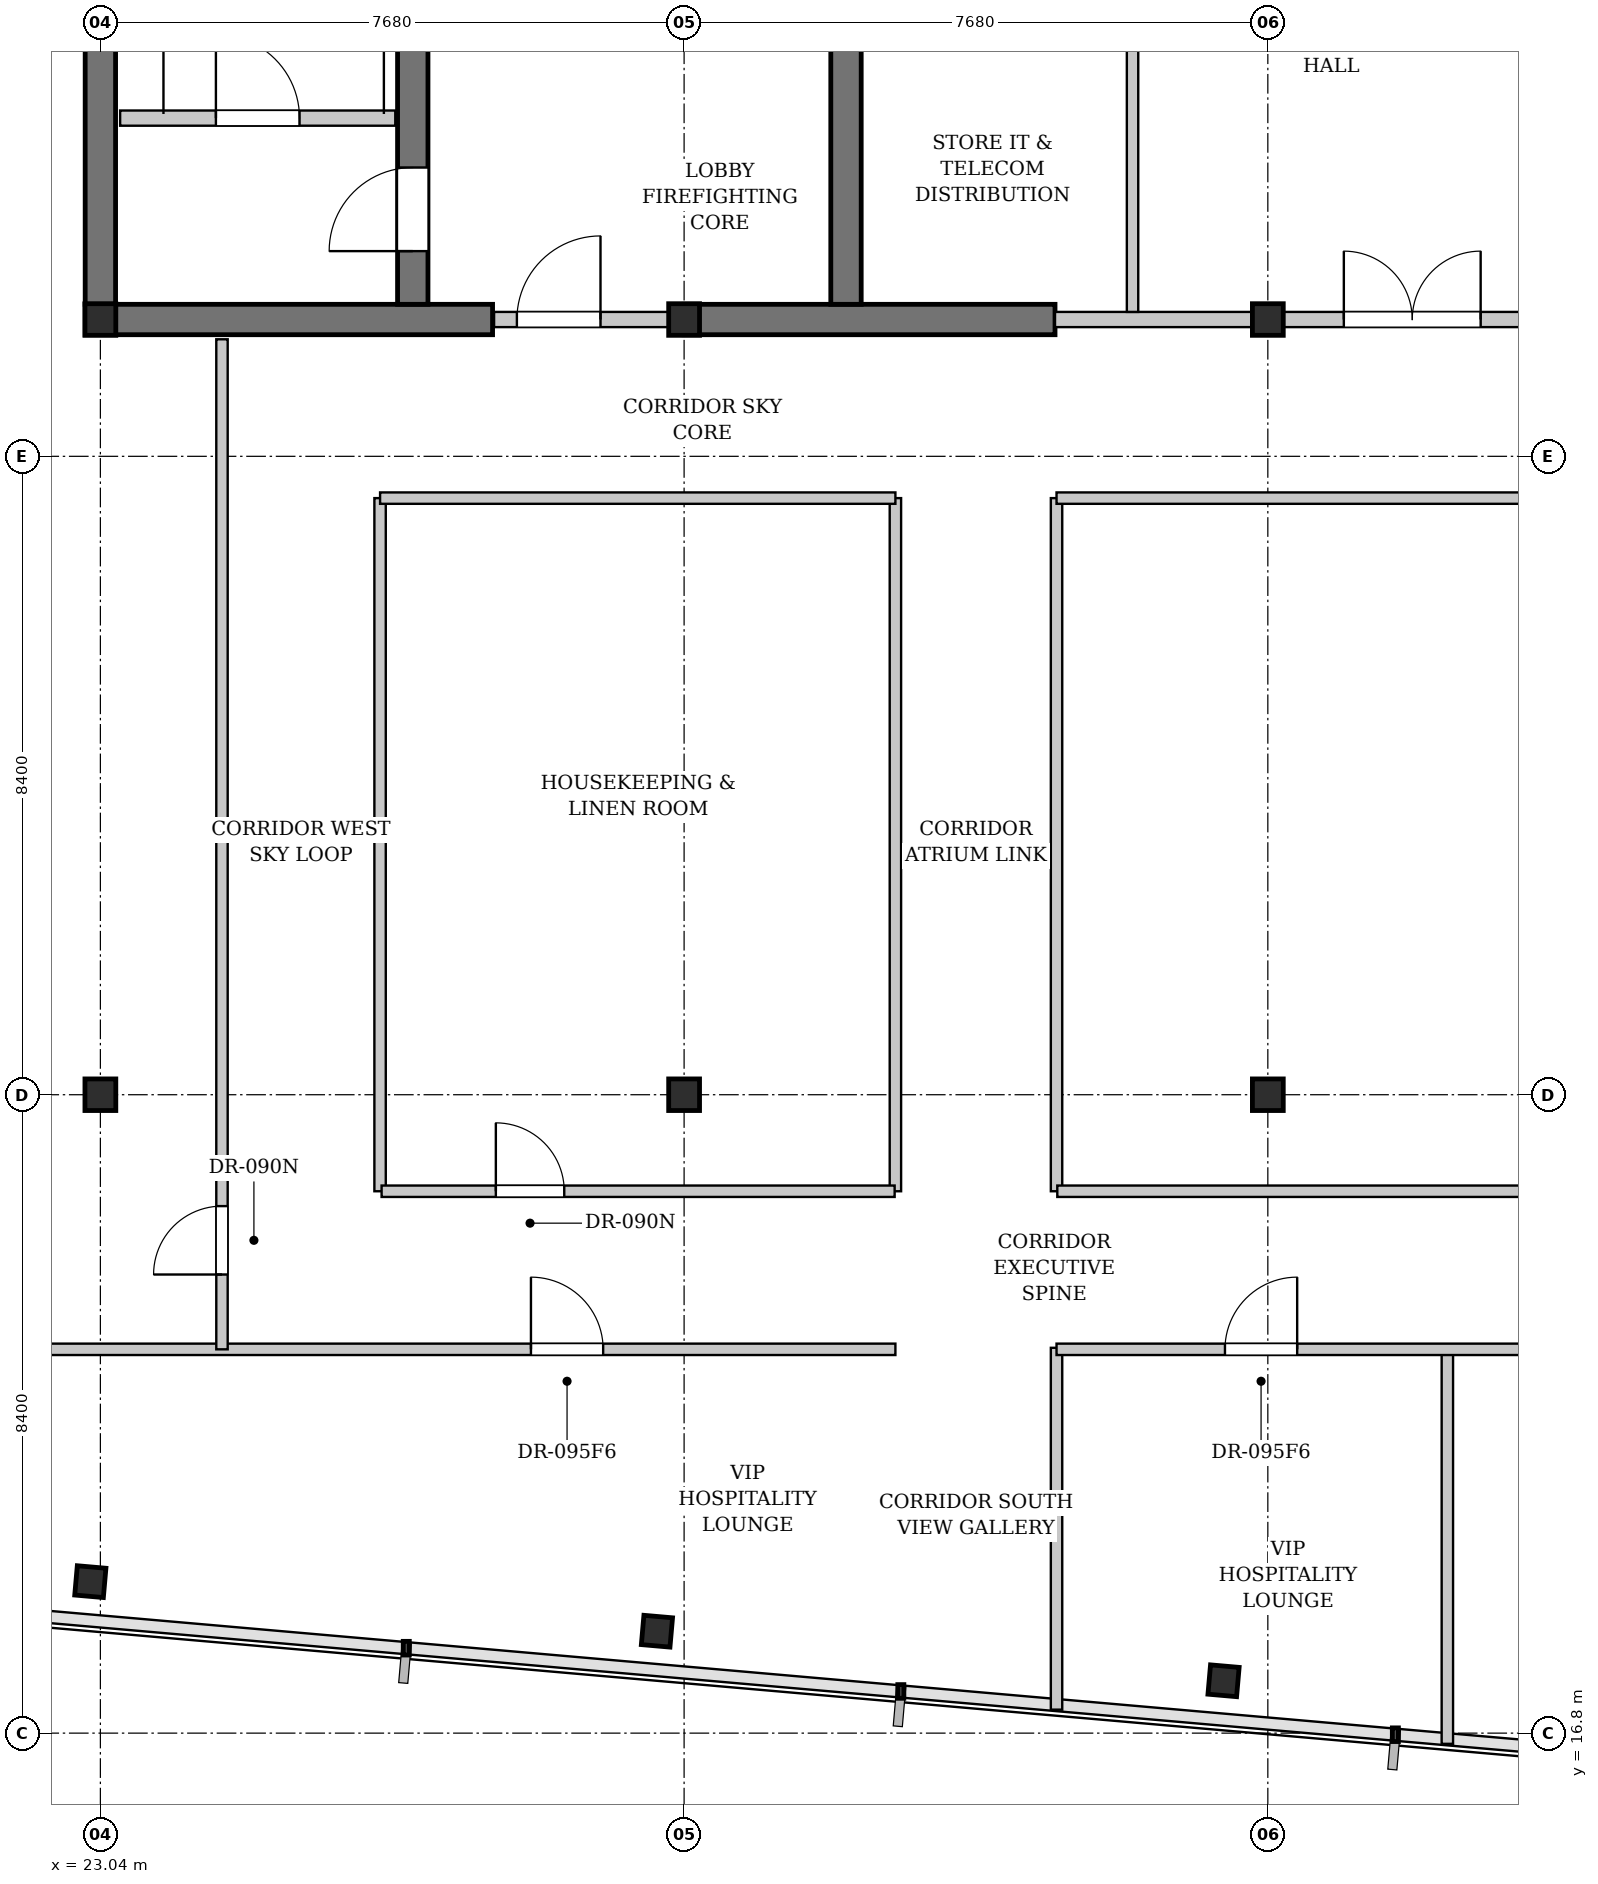
"""IFC4 building model, lengths in metres.
Left out: names, types, materials, properties, quantities, classifications, styles, units other than length and angle.
Written with IfcOpenShell. Run it as: python <this file> out.ifc"""

import sys

from ifc_helpers import new_model, si_unit, direction, frame, frame_2d, origin, origin_2d, place, context, subcontext, project, spatial, rectangle, i_section, extrude, element, fill, save


model = new_model("IFC4")
c1 = context("Model", 3, precision=1e-05, world=origin(), true_north=direction((0.0, 1.0)))
c2 = subcontext(c1, "Body", "Model", "MODEL_VIEW")
j1 = project(units=[si_unit("LENGTHUNIT", "METRE"), si_unit("PLANEANGLEUNIT", "RADIAN")], contexts=[c1])
p1 = place(None, origin())
s1 = spatial("IfcSite", under=j1, at=p1, CompositionType="ELEMENT")
p2 = place(p1, origin())
s2 = spatial("IfcBuilding", under=s1, at=p2, CompositionType="ELEMENT")
p3 = place(p2, frame((0.0, 0.0, 276.1)))
s3 = spatial("IfcBuildingStorey", under=s2, at=p3, CompositionType="ELEMENT", Elevation=276.1)
p4 = place(p3, frame((22.84, 35.4, 0.0), z_axis=(0.0, 0.0, 1.0), x_axis=(1.0, 0.0, 0.0)))
e1 = element("IfcWall", 1, at=p4, inside=s3, PredefinedType="SHEAR", context=c2, shape_type="SweptSolid", body=[
    extrude(rectangle(XDim=5.36, YDim=0.4, at=frame_2d((2.68, 0.0))), origin(), (0.0, 0.0, 1.0), 3.18),
])
p5 = place(p3, frame((30.72, 35.4, 0.0), z_axis=(0.0, 0.0, 1.0), x_axis=(1.0, 0.0, 0.0)))
e2 = element("IfcWall", 2, at=p5, inside=s3, PredefinedType="SHEAR", context=c2, shape_type="SweptSolid", body=[
    extrude(rectangle(XDim=4.88, YDim=0.4, at=frame_2d((2.44, 0.0))), origin(), (0.0, 0.0, 1.0), 3.18),
])
p6 = place(p3, frame((23.04, 35.6, 0.0), z_axis=(0.0, 0.0, 1.0), x_axis=(0.0, 1.0, 0.0)))
e3 = element("IfcWall", 3, at=p6, inside=s3, PredefinedType="SHEAR", context=c2, shape_type="SweptSolid", body=[
    extrude(rectangle(XDim=10.4, YDim=0.4, at=frame_2d((5.2, 0.0))), origin(), (0.0, 0.0, 1.0), 3.18),
])
p7 = place(p3, frame((27.15, 35.6, 0.0), z_axis=(0.0, 0.0, 1.0), x_axis=(0.0, 1.0, 0.0)))
e4 = element("IfcWall", 4, at=p7, inside=s3, PredefinedType="SHEAR", context=c2, shape_type="SweptSolid", body=[
    extrude(rectangle(XDim=10.4, YDim=0.4, at=frame_2d((5.2, 0.0))), origin(), (0.0, 0.0, 1.0), 3.18),
])
p8 = place(p7, frame((0.7, 0.0, 0.0)))
e5 = element("IfcOpeningElement", 5, at=p8, cuts=e4, PredefinedType="OPENING", context=c2, shape_type="SweptSolid", body=[
    extrude(rectangle(XDim=1.1, YDim=2.15, at=frame_2d((0.55, 1.075))), frame((0.0, 0.21, 0.0), z_axis=(0.0, -1.0, 0.0), x_axis=(1.0, 0.0, 0.0)), (0.0, 0.0, 1.0), 0.42),
])
p9 = place(p3, frame((32.85, 35.6, 0.0), z_axis=(0.0, 0.0, 1.0), x_axis=(0.0, 1.0, 0.0)))
e6 = element("IfcWall", 6, at=p9, inside=s3, PredefinedType="SHEAR", context=c2, shape_type="SweptSolid", body=[
    extrude(rectangle(XDim=10.4, YDim=0.4, at=frame_2d((5.2, 0.0))), origin(), (0.0, 0.0, 1.0), 3.18),
])
for number, where, z_axis, x_axis in (
    (7, (23.04, 35.4, 0.0), (0.0, 0.0, 1.0), (1.0, 0.0, 0.0)),
    (8, (23.04, 25.2, 0.0), (0.0, 0.0, 1.0), (1.0, 0.0, 0.0)),
    (9, (30.72, 35.4, 0.0), (0.0, 0.0, 1.0), (1.0, 0.0, 0.0)),
    (10, (30.72, 25.2, 0.0), (0.0, 0.0, 1.0), (1.0, 0.0, 0.0)),
    (11, (38.4, 35.4, 0.0), (0.0, 0.0, 1.0), (1.0, 0.0, 0.0)),
    (12, (38.4, 25.2, 0.0), (0.0, 0.0, 1.0), (1.0, 0.0, 0.0)),
):
    element("IfcColumn", number, at=place(p3, frame(where, z_axis=z_axis, x_axis=x_axis)), inside=s3, PredefinedType="COLUMN", context=c2, shape_type="SweptSolid", body=[
        extrude(i_section(OverallWidth=0.406, OverallDepth=0.416, WebThickness=0.03, FlangeThickness=0.048, FilletRadius=0.015, at=origin_2d()), origin(), (0.0, 0.0, 1.0), 3.4),
    ])
for number, where, z_axis, x_axis in (
    (13, (22.908, 18.793, 0.0), (0.0, 0.0, 1.0), (0.996, -0.087, 0.0)),
    (14, (30.363, 18.141, 0.0), (0.0, 0.0, 1.0), (0.996, -0.087, 0.0)),
    (15, (37.817, 17.489, 0.0), (0.0, 0.0, 1.0), (0.996, -0.087, 0.0)),
):
    element("IfcColumn", number, at=place(p3, frame(where, z_axis=z_axis, x_axis=x_axis)), inside=s3, PredefinedType="COLUMN", context=c2, shape_type="SweptSolid", body=[
        extrude(i_section(OverallWidth=0.378, OverallDepth=0.387, WebThickness=0.021, FlangeThickness=0.033, FilletRadius=0.015, at=origin_2d()), origin(), (0.0, 0.0, 1.0), 3.4),
    ])
p10 = place(p3, frame((23.3, 38.05, 0.0), z_axis=(0.0, 0.0, 1.0), x_axis=(1.0, 0.0, 0.0)))
e16 = element("IfcWall", 16, at=p10, inside=s3, PredefinedType="PARTITIONING", context=c2, shape_type="SweptSolid", body=[
    extrude(rectangle(XDim=3.62, YDim=0.2, at=frame_2d((1.81, 0.0))), origin(), (0.0, 0.0, 1.0), 3.18),
])
p11 = place(p10, frame((1.26, 0.0, 0.0)))
e17 = element("IfcOpeningElement", 17, at=p11, cuts=e16, PredefinedType="OPENING", context=c2, shape_type="SweptSolid", body=[
    extrude(rectangle(XDim=1.1, YDim=2.15, at=frame_2d((0.55, 1.075))), frame((0.0, 0.11, 0.0), z_axis=(0.0, -1.0, 0.0), x_axis=(1.0, 0.0, 0.0)), (0.0, 0.0, 1.0), 0.22),
])
p12 = place(p3, frame((28.22, 35.4, 0.0), z_axis=(0.0, 0.0, 1.0), x_axis=(1.0, 0.0, 0.0)))
e18 = element("IfcWall", 18, at=p12, inside=s3, PredefinedType="PARTITIONING", context=c2, shape_type="SweptSolid", body=[
    extrude(rectangle(XDim=2.5, YDim=0.2, at=frame_2d((1.25, 0.0))), origin(), (0.0, 0.0, 1.0), 2.575),
])
p13 = place(p12, frame((0.3, 0.0, 0.0)))
e19 = element("IfcOpeningElement", 19, at=p13, cuts=e18, PredefinedType="OPENING", context=c2, shape_type="SweptSolid", body=[
    extrude(rectangle(XDim=1.1, YDim=2.15, at=frame_2d((0.55, 1.075))), frame((0.0, 0.11, 0.0), z_axis=(0.0, -1.0, 0.0), x_axis=(1.0, 0.0, 0.0)), (0.0, 0.0, 1.0), 0.22),
])
p14 = place(p3, frame((35.6, 35.4, 0.0), z_axis=(0.0, 0.0, 1.0), x_axis=(1.0, 0.0, 0.0)))
e20 = element("IfcWall", 20, at=p14, inside=s3, PredefinedType="PARTITIONING", context=c2, shape_type="SweptSolid", body=[
    extrude(rectangle(XDim=6.5, YDim=0.2, at=frame_2d((3.25, 0.0))), origin(), (0.0, 0.0, 1.0), 2.575),
])
p15 = place(p14, frame((3.8, 0.0, 0.0)))
e21 = element("IfcOpeningElement", 21, at=p15, cuts=e20, PredefinedType="OPENING", context=c2, shape_type="SweptSolid", body=[
    extrude(rectangle(XDim=1.8, YDim=2.3, at=frame_2d((0.9, 1.15))), frame((0.0, 0.11, 0.0), z_axis=(0.0, -1.0, 0.0), x_axis=(1.0, 0.0, 0.0)), (0.0, 0.0, 1.0), 0.22),
])
p16 = place(p3, frame((36.62, 35.5, 0.0), z_axis=(0.0, 0.0, 1.0), x_axis=(0.0, 1.0, 0.0)))
e22 = element("IfcWall", 22, at=p16, inside=s3, PredefinedType="PARTITIONING", context=c2, shape_type="SweptSolid", body=[
    extrude(rectangle(XDim=10.42, YDim=0.15, at=frame_2d((5.21, 0.0))), origin(), (0.0, 0.0, 1.0), 3.18),
])
p17 = place(p16, frame((3.92, 0.0, 0.0)))
e23 = element("IfcOpeningElement", 23, at=p17, cuts=e22, PredefinedType="OPENING", context=c2, shape_type="SweptSolid", body=[
    extrude(rectangle(XDim=0.9, YDim=2.15, at=frame_2d((0.45, 1.075))), frame((0.0, 0.085, 0.0), z_axis=(0.0, -1.0, 0.0), x_axis=(1.0, 0.0, 0.0)), (0.0, 0.0, 1.0), 0.17),
])
p18 = place(p16, frame((5.85, 0.0, 0.0)))
e24 = element("IfcOpeningElement", 24, at=p18, cuts=e22, PredefinedType="OPENING", context=c2, shape_type="SweptSolid", body=[
    extrude(rectangle(XDim=0.9, YDim=2.15, at=frame_2d((0.45, 1.075))), frame((0.0, 0.085, 0.0), z_axis=(0.0, -1.0, 0.0), x_axis=(1.0, 0.0, 0.0)), (0.0, 0.0, 1.0), 0.17),
])
p19 = place(p3, frame((35.62, 17.109, 0.0), z_axis=(0.0, 0.0, 1.0), x_axis=(0.0, 1.0, 0.0)))
e25 = element("IfcWall", 25, at=p19, inside=s3, PredefinedType="PARTITIONING", context=c2, shape_type="SweptSolid", body=[
    extrude(rectangle(XDim=4.761, YDim=0.15, at=frame_2d((2.381, 0.0))), origin(), (0.0, 0.0, 1.0), 3.18),
])
p20 = place(p3, frame((40.762, 16.659, 0.0), z_axis=(0.0, 0.0, 1.0), x_axis=(0.0, 1.0, 0.0)))
e26 = element("IfcWall", 26, at=p20, inside=s3, PredefinedType="PARTITIONING", context=c2, shape_type="SweptSolid", body=[
    extrude(rectangle(XDim=5.211, YDim=0.15, at=frame_2d((2.605, 0.0))), origin(), (0.0, 0.0, 1.0), 3.18),
])
p21 = place(p3, frame((6.74, 21.85, 0.0), z_axis=(0.0, 0.0, 1.0), x_axis=(1.0, 0.0, 0.0)))
e27 = element("IfcWall", 27, at=p21, inside=s3, PredefinedType="PARTITIONING", context=c2, shape_type="SweptSolid", body=[
    extrude(rectangle(XDim=26.76, YDim=0.15, at=frame_2d((13.38, 0.0))), origin(), (0.0, 0.0, 1.0), 2.575),
])
p22 = place(p21, frame((21.965, 0.0, 0.0)))
e28 = element("IfcOpeningElement", 28, at=p22, cuts=e27, PredefinedType="OPENING", context=c2, shape_type="SweptSolid", body=[
    extrude(rectangle(XDim=0.95, YDim=2.15, at=frame_2d((0.475, 1.075))), frame((0.0, 0.085, 0.0), z_axis=(0.0, -1.0, 0.0), x_axis=(1.0, 0.0, 0.0)), (0.0, 0.0, 1.0), 0.17),
])
p23 = place(p3, frame((35.62, 21.85, 0.0), z_axis=(0.0, 0.0, 1.0), x_axis=(1.0, 0.0, 0.0)))
e29 = element("IfcWall", 29, at=p23, inside=s3, PredefinedType="PARTITIONING", context=c2, shape_type="SweptSolid", body=[
    extrude(rectangle(XDim=20.082, YDim=0.15, at=frame_2d((10.041, 0.0))), origin(), (0.0, 0.0, 1.0), 3.18),
])
p24 = place(p23, frame((2.216, 0.0, 0.0)))
e30 = element("IfcOpeningElement", 30, at=p24, cuts=e29, PredefinedType="OPENING", context=c2, shape_type="SweptSolid", body=[
    extrude(rectangle(XDim=0.95, YDim=2.15, at=frame_2d((0.475, 1.075))), frame((0.0, 0.085, 0.0), z_axis=(0.0, -1.0, 0.0), x_axis=(1.0, 0.0, 0.0)), (0.0, 0.0, 1.0), 0.17),
])
p25 = place(p23, frame((7.037, 0.0, 0.0)))
e31 = element("IfcOpeningElement", 31, at=p25, cuts=e29, PredefinedType="OPENING", context=c2, shape_type="SweptSolid", body=[
    extrude(rectangle(XDim=0.95, YDim=2.15, at=frame_2d((0.475, 1.075))), frame((0.0, 0.085, 0.0), z_axis=(0.0, -1.0, 0.0), x_axis=(1.0, 0.0, 0.0)), (0.0, 0.0, 1.0), 0.17),
])
p26 = place(p23, frame((12.736, 0.0, 0.0)))
e32 = element("IfcOpeningElement", 32, at=p26, cuts=e29, PredefinedType="OPENING", context=c2, shape_type="SweptSolid", body=[
    extrude(rectangle(XDim=0.95, YDim=2.15, at=frame_2d((0.475, 1.075))), frame((0.0, 0.085, 0.0), z_axis=(0.0, -1.0, 0.0), x_axis=(1.0, 0.0, 0.0)), (0.0, 0.0, 1.0), 0.17),
])
p27 = place(p3, frame((24.64, 21.85, 0.0), z_axis=(0.0, 0.0, 1.0), x_axis=(0.0, 1.0, 0.0)))
e33 = element("IfcWall", 33, at=p27, inside=s3, PredefinedType="PARTITIONING", context=c2, shape_type="SweptSolid", body=[
    extrude(rectangle(XDim=13.29, YDim=0.15, at=frame_2d((6.645, 0.0))), origin(), (0.0, 0.0, 1.0), 3.18),
])
p28 = place(p27, frame((0.984, 0.0, 0.0)))
e34 = element("IfcOpeningElement", 34, at=p28, cuts=e33, PredefinedType="OPENING", context=c2, shape_type="SweptSolid", body=[
    extrude(rectangle(XDim=0.9, YDim=2.15, at=frame_2d((0.45, 1.075))), frame((0.0, 0.085, 0.0), z_axis=(0.0, -1.0, 0.0), x_axis=(1.0, 0.0, 0.0)), (0.0, 0.0, 1.0), 0.17),
])
for number, where, z_axis, x_axis in (
    (35, (26.72, 23.93, 0.0), (0.0, 0.0, 1.0), (0.0, 1.0, 0.0)),
    (36, (33.5, 23.93, 0.0), (0.0, 0.0, 1.0), (0.0, 1.0, 0.0)),
    (37, (35.62, 23.93, 0.0), (0.0, 0.0, 1.0), (0.0, 1.0, 0.0)),
):
    element("IfcWall", number, at=place(p3, frame(where, z_axis=z_axis, x_axis=x_axis)), inside=s3, PredefinedType="PARTITIONING", context=c2, shape_type="SweptSolid", body=[
        extrude(rectangle(XDim=9.12, YDim=0.15, at=frame_2d((4.56, 0.0))), origin(), (0.0, 0.0, 1.0), 3.18),
    ])
p29 = place(p3, frame((26.72, 33.05, 0.0), z_axis=(0.0, 0.0, 1.0), x_axis=(1.0, 0.0, 0.0)))
e38 = element("IfcWall", 38, at=p29, inside=s3, PredefinedType="PARTITIONING", context=c2, shape_type="SweptSolid", body=[
    extrude(rectangle(XDim=6.78, YDim=0.15, at=frame_2d((3.39, 0.0))), origin(), (0.0, 0.0, 1.0), 3.18),
])
p30 = place(p3, frame((35.62, 33.05, 0.0), z_axis=(0.0, 0.0, 1.0), x_axis=(1.0, 0.0, 0.0)))
e39 = element("IfcWall", 39, at=p30, inside=s3, PredefinedType="PARTITIONING", context=c2, shape_type="SweptSolid", body=[
    extrude(rectangle(XDim=14.46, YDim=0.15, at=frame_2d((7.23, 0.0))), origin(), (0.0, 0.0, 1.0), 3.18),
])
p31 = place(p3, frame((26.74, 23.93, 0.0), z_axis=(0.0, 0.0, 1.0), x_axis=(1.0, 0.0, 0.0)))
e40 = element("IfcWall", 40, at=p31, inside=s3, PredefinedType="PARTITIONING", context=c2, shape_type="SweptSolid", body=[
    extrude(rectangle(XDim=6.75, YDim=0.15, at=frame_2d((3.375, 0.0))), origin(), (0.0, 0.0, 1.0), 3.18),
])
p32 = place(p31, frame((1.503, 0.0, 0.0)))
e41 = element("IfcOpeningElement", 41, at=p32, cuts=e40, PredefinedType="OPENING", context=c2, shape_type="SweptSolid", body=[
    extrude(rectangle(XDim=0.9, YDim=2.15, at=frame_2d((0.45, 1.075))), frame((0.0, 0.085, 0.0), z_axis=(0.0, -1.0, 0.0), x_axis=(1.0, 0.0, 0.0)), (0.0, 0.0, 1.0), 0.17),
])
p33 = place(p3, frame((35.63, 23.93, 0.0), z_axis=(0.0, 0.0, 1.0), x_axis=(1.0, 0.0, 0.0)))
e42 = element("IfcWall", 42, at=p33, inside=s3, PredefinedType="PARTITIONING", context=c2, shape_type="SweptSolid", body=[
    extrude(rectangle(XDim=14.43, YDim=0.15, at=frame_2d((7.215, 0.0))), origin(), (0.0, 0.0, 1.0), 3.18),
])
p34 = place(p33, frame((6.765, 0.0, 0.0)))
e43 = element("IfcOpeningElement", 43, at=p34, cuts=e42, PredefinedType="OPENING", context=c2, shape_type="SweptSolid", body=[
    extrude(rectangle(XDim=0.9, YDim=2.15, at=frame_2d((0.45, 1.075))), frame((0.0, 0.085, 0.0), z_axis=(0.0, -1.0, 0.0), x_axis=(1.0, 0.0, 0.0)), (0.0, 0.0, 1.0), 0.17),
])
p35 = place(p11, origin())
e44 = element("IfcDoor", 44, at=p35, inside=s3, OperationType="SINGLE_SWING_LEFT", PredefinedType="DOOR", context=c2, shape_type="SweptSolid", body=[
    extrude(rectangle(XDim=1.1, YDim=2.15, at=frame_2d((0.55, 1.075))), frame((0.0, 0.025, 0.0), z_axis=(0.0, -1.0, 0.0), x_axis=(1.0, 0.0, 0.0)), (0.0, 0.0, 1.0), 0.05),
])
fill(e17, e44)
p36 = place(p13, origin())
e45 = element("IfcDoor", 45, at=p36, inside=s3, OperationType="SINGLE_SWING_RIGHT", PredefinedType="DOOR", context=c2, shape_type="SweptSolid", body=[
    extrude(rectangle(XDim=1.1, YDim=2.15, at=frame_2d((0.55, 1.075))), frame((0.0, 0.025, 0.0), z_axis=(0.0, -1.0, 0.0), x_axis=(1.0, 0.0, 0.0)), (0.0, 0.0, 1.0), 0.05),
])
fill(e19, e45)
p37 = place(p15, origin())
e46 = element("IfcDoor", 46, at=p37, inside=s3, OperationType="DOUBLE_DOOR_SINGLE_SWING", PredefinedType="DOOR", context=c2, shape_type="SweptSolid", body=[
    extrude(rectangle(XDim=1.8, YDim=2.3, at=frame_2d((0.9, 1.15))), frame((0.0, 0.025, 0.0), z_axis=(0.0, -1.0, 0.0), x_axis=(1.0, 0.0, 0.0)), (0.0, 0.0, 1.0), 0.05),
])
fill(e21, e46)
p38 = place(p22, origin())
e47 = element("IfcDoor", 47, at=p38, inside=s3, OperationType="SINGLE_SWING_LEFT", PredefinedType="DOOR", context=c2, shape_type="SweptSolid", body=[
    extrude(rectangle(XDim=0.95, YDim=2.15, at=frame_2d((0.475, 1.075))), frame((0.0, 0.025, 0.0), z_axis=(0.0, -1.0, 0.0), x_axis=(1.0, 0.0, 0.0)), (0.0, 0.0, 1.0), 0.05),
])
fill(e28, e47)
p39 = place(p24, origin())
e48 = element("IfcDoor", 48, at=p39, inside=s3, OperationType="SINGLE_SWING_RIGHT", PredefinedType="DOOR", context=c2, shape_type="SweptSolid", body=[
    extrude(rectangle(XDim=0.95, YDim=2.15, at=frame_2d((0.475, 1.075))), frame((0.0, 0.025, 0.0), z_axis=(0.0, -1.0, 0.0), x_axis=(1.0, 0.0, 0.0)), (0.0, 0.0, 1.0), 0.05),
])
fill(e30, e48)
p40 = place(p28, origin())
e49 = element("IfcDoor", 49, at=p40, inside=s3, OperationType="SINGLE_SWING_LEFT", PredefinedType="DOOR", context=c2, shape_type="SweptSolid", body=[
    extrude(rectangle(XDim=0.9, YDim=2.15, at=frame_2d((0.45, 1.075))), frame((0.0, 0.025, 0.0), z_axis=(0.0, -1.0, 0.0), x_axis=(1.0, 0.0, 0.0)), (0.0, 0.0, 1.0), 0.05),
])
fill(e34, e49)
p41 = place(p32, origin())
e50 = element("IfcDoor", 50, at=p41, inside=s3, OperationType="SINGLE_SWING_LEFT", PredefinedType="DOOR", context=c2, shape_type="SweptSolid", body=[
    extrude(rectangle(XDim=0.9, YDim=2.15, at=frame_2d((0.45, 1.075))), frame((0.0, 0.025, 0.0), z_axis=(0.0, -1.0, 0.0), x_axis=(1.0, 0.0, 0.0)), (0.0, 0.0, 1.0), 0.05),
])
fill(e41, e50)
p42 = place(p8, origin())
e51 = element("IfcDoor", 51, at=p42, inside=s3, OperationType="SINGLE_SWING_LEFT", PredefinedType="DOOR", context=c2, shape_type="SweptSolid", body=[
    extrude(rectangle(XDim=1.1, YDim=2.15, at=frame_2d((0.55, 1.075))), frame((0.0, 0.025, 0.0), z_axis=(0.0, -1.0, 0.0), x_axis=(1.0, 0.0, 0.0)), (0.0, 0.0, 1.0), 0.05),
])
fill(e5, e51)
save(model, sys.argv[1])
